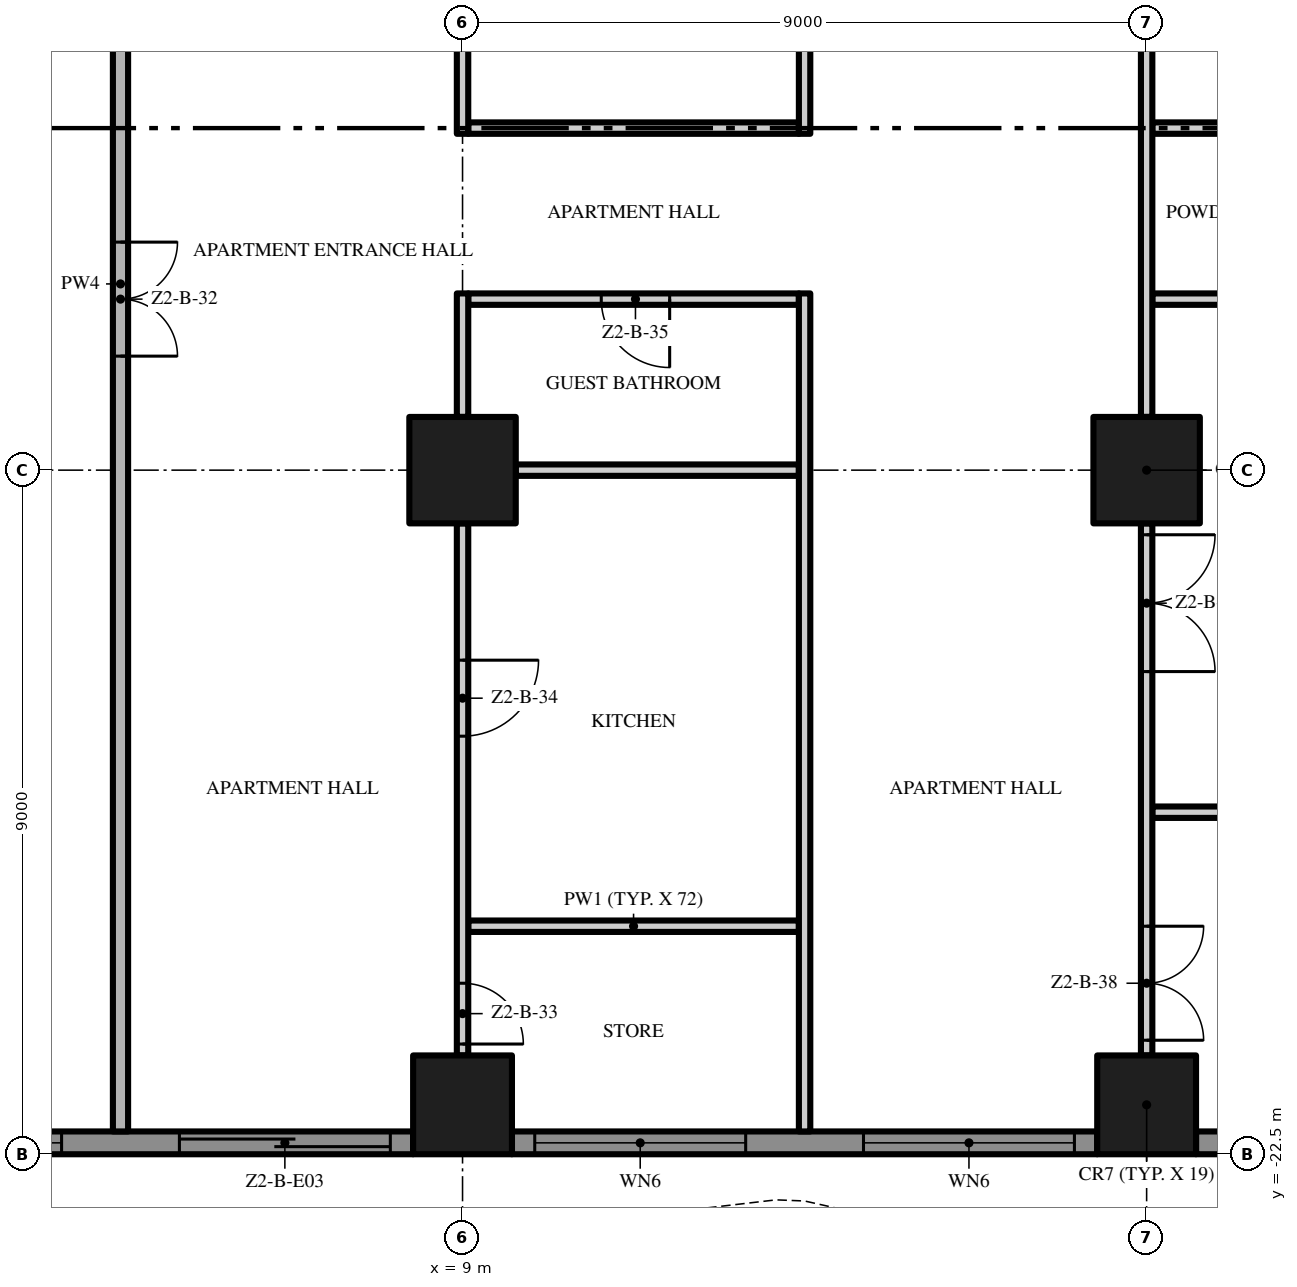
"""IFC4 building model, lengths in metres.
Left out: names, types, materials, properties, quantities, classifications, styles, units other than length and angle.
Written with IfcOpenShell. Run it as: python <this file> out.ifc"""

import sys

from ifc_helpers import new_model, si_unit, direction, frame, frame_2d, origin, origin_2d, place, context, subcontext, project, spatial, polyline, rectangle, outline, extrude, element, fill, save


model = new_model("IFC4")
c1 = context("Model", 3, precision=1e-05, world=origin(), true_north=direction((0.0, 1.0)))
c2 = subcontext(c1, "Body", "Model", "MODEL_VIEW")
j1 = project(units=[si_unit("LENGTHUNIT", "METRE"), si_unit("PLANEANGLEUNIT", "RADIAN")], contexts=[c1])
p1 = place(None, origin())
s1 = spatial("IfcSite", under=j1, at=p1, CompositionType="ELEMENT")
p2 = place(p1, origin())
s2 = spatial("IfcBuilding", under=s1, at=p2, CompositionType="ELEMENT")
p3 = place(p2, frame((0.0, 0.0, 88.4)))
s3 = spatial("IfcBuildingStorey", under=s2, at=p3, CompositionType="ELEMENT", Elevation=88.4)
p4 = place(p3, frame((18.0, -13.5, 0.0), z_axis=(0.0, 0.0, 1.0), x_axis=(1.0, 0.0, 0.0)))
e1 = element("IfcColumn", 1, at=p4, inside=s3, PredefinedType="COLUMN", context=c2, shape_type="SweptSolid", body=[
    extrude(rectangle(XDim=1.4, YDim=1.4, at=origin_2d()), origin(), (0.0, 0.0, 1.0), 3.5),
])
p5 = place(p3, frame((18.0, -21.85, 0.0), z_axis=(0.0, 0.0, 1.0), x_axis=(1.0, 0.0, 0.0)))
e2 = element("IfcColumn", 2, at=p5, inside=s3, PredefinedType="COLUMN", context=c2, shape_type="SweptSolid", body=[
    extrude(rectangle(XDim=1.3, YDim=1.3, at=origin_2d()), origin(), (0.0, 0.0, 1.0), 3.5),
])
p6 = place(p3, frame((9.0, -13.5, 0.0), z_axis=(0.0, 0.0, 1.0), x_axis=(1.0, 0.0, 0.0)))
e3 = element("IfcColumn", 3, at=p6, inside=s3, PredefinedType="COLUMN", context=c2, shape_type="SweptSolid", body=[
    extrude(rectangle(XDim=1.4, YDim=1.4, at=origin_2d()), origin(), (0.0, 0.0, 1.0), 3.5),
])
p7 = place(p3, frame((9.0, -21.85, 0.0), z_axis=(0.0, 0.0, 1.0), x_axis=(1.0, 0.0, 0.0)))
e4 = element("IfcColumn", 4, at=p7, inside=s3, PredefinedType="COLUMN", context=c2, shape_type="SweptSolid", body=[
    extrude(rectangle(XDim=1.3, YDim=1.3, at=origin_2d()), origin(), (0.0, 0.0, 1.0), 3.5),
])
p8 = place(p3, frame((8.35, -22.35, 0.0), z_axis=(0.0, 0.0, 1.0), x_axis=(-1.0, 0.0, 0.0)))
e5 = element("IfcWall", 5, at=p8, inside=s3, PredefinedType="SOLIDWALL", context=c2, shape_type="SweptSolid", body=[
    extrude(rectangle(XDim=7.7, YDim=0.3, at=frame_2d((3.85, 0.0))), origin(), (0.0, 0.0, 1.0), 3.5),
])
p9 = place(p8, frame((4.625, 0.0, 0.45)))
e6 = element("IfcOpeningElement", 6, at=p9, cuts=e5, PredefinedType="OPENING", context=c2, shape_type="SweptSolid", body=[
    extrude(rectangle(XDim=2.775, YDim=2.65, at=frame_2d((1.387, 1.325))), frame((0.0, 0.16, 0.0), z_axis=(0.0, -1.0, 0.0), x_axis=(1.0, 0.0, 0.0)), (0.0, 0.0, 1.0), 0.32),
])
p10 = place(p8, frame((0.3, 0.0, 0.0)))
e7 = element("IfcOpeningElement", 7, at=p10, cuts=e5, PredefinedType="OPENING", context=c2, shape_type="SweptSolid", body=[
    extrude(rectangle(XDim=2.775, YDim=2.4, at=frame_2d((1.387, 1.2))), frame((0.0, 0.16, 0.0), z_axis=(0.0, -1.0, 0.0), x_axis=(1.0, 0.0, 0.0)), (0.0, 0.0, 1.0), 0.32),
])
p11 = place(p3, frame((17.35, -22.35, 0.0), z_axis=(0.0, 0.0, 1.0), x_axis=(-1.0, 0.0, 0.0)))
e8 = element("IfcWall", 8, at=p11, inside=s3, PredefinedType="SOLIDWALL", context=c2, shape_type="SweptSolid", body=[
    extrude(rectangle(XDim=7.7, YDim=0.3, at=frame_2d((3.85, 0.0))), origin(), (0.0, 0.0, 1.0), 3.5),
])
p12 = place(p11, frame((4.625, 0.0, 0.45)))
e9 = element("IfcOpeningElement", 9, at=p12, cuts=e8, PredefinedType="OPENING", context=c2, shape_type="SweptSolid", body=[
    extrude(rectangle(XDim=2.775, YDim=2.65, at=frame_2d((1.387, 1.325))), frame((0.0, 0.16, 0.0), z_axis=(0.0, -1.0, 0.0), x_axis=(1.0, 0.0, 0.0)), (0.0, 0.0, 1.0), 0.32),
])
p13 = place(p11, frame((0.3, 0.0, 0.45)))
e10 = element("IfcOpeningElement", 10, at=p13, cuts=e8, PredefinedType="OPENING", context=c2, shape_type="SweptSolid", body=[
    extrude(rectangle(XDim=2.775, YDim=2.65, at=frame_2d((1.387, 1.325))), frame((0.0, 0.16, 0.0), z_axis=(0.0, -1.0, 0.0), x_axis=(1.0, 0.0, 0.0)), (0.0, 0.0, 1.0), 0.32),
])
p14 = place(p3, frame((22.5, -22.35, 0.0), z_axis=(0.0, 0.0, 1.0), x_axis=(-1.0, 0.0, 0.0)))
e11 = element("IfcWall", 11, at=p14, inside=s3, PredefinedType="SOLIDWALL", context=c2, shape_type="SweptSolid", body=[
    extrude(rectangle(XDim=3.85, YDim=0.3, at=frame_2d((1.925, 0.0))), origin(), (0.0, 0.0, 1.0), 3.5),
])
p15 = place(p14, frame((0.775, 0.0, 0.0)))
e12 = element("IfcOpeningElement", 12, at=p15, cuts=e11, PredefinedType="OPENING", context=c2, shape_type="SweptSolid", body=[
    extrude(rectangle(XDim=2.775, YDim=2.4, at=frame_2d((1.387, 1.2))), frame((0.0, 0.16, 0.0), z_axis=(0.0, -1.0, 0.0), x_axis=(1.0, 0.0, 0.0)), (0.0, 0.0, 1.0), 0.32),
])
p16 = place(p3, origin())
e13 = element("IfcWall", 13, at=p16, inside=s3, PredefinedType="USERDEFINED", context=c2, shape_type="SweptSolid", body=[
    extrude(outline(polyline([(-22.5, -25.149), (-21.0, -24.488), (-19.5, -23.755), (-18.0, -23.231), (-16.875, -23.1), (-16.5, -23.115), (-15.0, -23.451), (-13.5, -24.112), (-12.0, -24.845), (-10.5, -25.369), (-9.375, -25.5), (-9.0, -25.485), (-7.5, -25.149), (-6.0, -24.488), (-4.5, -23.755), (-3.0, -23.231), (-1.875, -23.1), (-1.5, -23.115), (0.0, -23.451), (1.5, -24.112), (3.0, -24.845), (4.5, -25.369), (5.625, -25.5), (6.0, -25.485), (7.5, -25.149), (9.0, -24.488), (10.5, -23.755), (12.0, -23.231), (13.125, -23.1), (13.5, -23.115), (15.0, -23.451), (16.5, -24.112), (18.0, -24.845), (19.5, -25.369), (20.625, -25.5), (21.0, -25.485), (22.5, -25.149), (22.445, -24.905), (20.967, -25.236), (20.635, -25.249), (19.556, -25.124), (18.096, -24.614), (16.605, -23.885), (15.079, -23.213), (13.533, -22.866), (13.115, -22.849), (11.944, -22.986), (10.404, -23.524), (8.895, -24.261), (7.421, -24.91), (5.967, -25.236), (5.635, -25.249), (4.556, -25.124), (3.096, -24.614), (1.605, -23.885), (0.079, -23.213), (-1.467, -22.866), (-1.885, -22.849), (-3.056, -22.986), (-4.596, -23.524), (-6.105, -24.261), (-7.579, -24.91), (-9.033, -25.236), (-9.365, -25.249), (-10.444, -25.124), (-11.904, -24.614), (-13.395, -23.885), (-14.921, -23.213), (-16.467, -22.866), (-16.885, -22.849), (-18.056, -22.986), (-19.596, -23.524), (-21.105, -24.261), (-22.601, -24.92), (-22.5, -25.149)])), origin(), (0.0, 0.0, 1.0), 0.9),
])
p17 = place(p3, frame((9.075, -19.5, 0.0), z_axis=(0.0, 0.0, 1.0), x_axis=(1.0, 0.0, 0.0)))
e14 = element("IfcWall", 14, at=p17, inside=s3, PredefinedType="PARTITIONING", context=c2, shape_type="SweptSolid", body=[
    extrude(rectangle(XDim=4.35, YDim=0.15, at=frame_2d((2.175, 0.0))), origin(), (0.0, 0.0, 1.0), 3.5),
])
p18 = place(p3, frame((18.075, -18.0, 0.0), z_axis=(0.0, 0.0, 1.0), x_axis=(1.0, 0.0, 0.0)))
e15 = element("IfcWall", 15, at=p18, inside=s3, PredefinedType="PARTITIONING", context=c2, shape_type="SweptSolid", body=[
    extrude(rectangle(XDim=3.775, YDim=0.15, at=frame_2d((1.887, 0.0))), origin(), (0.0, 0.0, 1.0), 3.5),
])
p19 = place(p3, frame((9.7, -13.5, 0.0), z_axis=(0.0, 0.0, 1.0), x_axis=(1.0, 0.0, 0.0)))
e16 = element("IfcWall", 16, at=p19, inside=s3, PredefinedType="PARTITIONING", context=c2, shape_type="SweptSolid", body=[
    extrude(rectangle(XDim=3.725, YDim=0.15, at=frame_2d((1.863, 0.0))), origin(), (0.0, 0.0, 1.0), 3.5),
])
p20 = place(p3, frame((13.425, -11.25, 0.0), z_axis=(0.0, 0.0, 1.0), x_axis=(-1.0, 0.0, 0.0)))
e17 = element("IfcWall", 17, at=p20, inside=s3, PredefinedType="PARTITIONING", context=c2, shape_type="SweptSolid", body=[
    extrude(rectangle(XDim=4.35, YDim=0.15, at=frame_2d((2.175, 0.0))), origin(), (0.0, 0.0, 1.0), 3.5),
])
p21 = place(p20, frame((1.7, 0.0, 0.0)))
e18 = element("IfcOpeningElement", 18, at=p21, cuts=e17, PredefinedType="OPENING", context=c2, shape_type="SweptSolid", body=[
    extrude(rectangle(XDim=0.9, YDim=2.1, at=frame_2d((0.45, 1.05))), frame((0.0, 0.085, 0.0), z_axis=(0.0, -1.0, 0.0), x_axis=(1.0, 0.0, 0.0)), (0.0, 0.0, 1.0), 0.17),
])
p22 = place(p3, frame((18.075, -11.25, 0.0), z_axis=(0.0, 0.0, 1.0), x_axis=(1.0, 0.0, 0.0)))
e19 = element("IfcWall", 19, at=p22, inside=s3, PredefinedType="PARTITIONING", context=c2, shape_type="SweptSolid", body=[
    extrude(rectangle(XDim=2.85, YDim=0.15, at=frame_2d((1.425, 0.0))), origin(), (0.0, 0.0, 1.0), 3.5),
])
p23 = place(p3, frame((9.075, -9.0, 0.0), z_axis=(0.0, 0.0, 1.0), x_axis=(1.0, 0.0, 0.0)))
e20 = element("IfcWall", 20, at=p23, inside=s3, PredefinedType="PARTITIONING", context=c2, shape_type="SweptSolid", body=[
    extrude(rectangle(XDim=4.35, YDim=0.15, at=frame_2d((2.175, 0.0))), origin(), (0.0, 0.0, 1.0), 3.5),
])
p24 = place(p3, frame((18.075, -9.0, 0.0), z_axis=(0.0, 0.0, 1.0), x_axis=(1.0, 0.0, 0.0)))
e21 = element("IfcWall", 21, at=p24, inside=s3, PredefinedType="PARTITIONING", context=c2, shape_type="SweptSolid", body=[
    extrude(rectangle(XDim=2.85, YDim=0.15, at=frame_2d((1.425, 0.0))), origin(), (0.0, 0.0, 1.0), 3.5),
])
p25 = place(p3, frame((4.5, 0.1, 0.0), z_axis=(0.0, 0.0, 1.0), x_axis=(0.0, -1.0, 0.0)))
e22 = element("IfcWall", 22, at=p25, inside=s3, PredefinedType="PARTITIONING", context=c2, shape_type="SweptSolid", body=[
    extrude(rectangle(XDim=22.3, YDim=0.2, at=frame_2d((11.15, 0.0))), origin(), (0.0, 0.0, 1.0), 3.5),
])
p26 = place(p25, frame((10.6, 0.0, 0.0)))
e23 = element("IfcOpeningElement", 23, at=p26, cuts=e22, PredefinedType="OPENING", context=c2, shape_type="SweptSolid", body=[
    extrude(rectangle(XDim=1.5, YDim=2.4, at=frame_2d((0.75, 1.2))), frame((0.0, 0.11, 0.0), z_axis=(0.0, -1.0, 0.0), x_axis=(1.0, 0.0, 0.0)), (0.0, 0.0, 1.0), 0.22),
])
p27 = place(p3, frame((9.0, -14.2, 0.0), z_axis=(0.0, 0.0, 1.0), x_axis=(0.0, -1.0, 0.0)))
e24 = element("IfcWall", 24, at=p27, inside=s3, PredefinedType="PARTITIONING", context=c2, shape_type="SweptSolid", body=[
    extrude(rectangle(XDim=7.0, YDim=0.15, at=frame_2d((3.5, 0.0))), origin(), (0.0, 0.0, 1.0), 3.5),
])
p28 = place(p27, frame((6.05, 0.0, 0.0)))
e25 = element("IfcOpeningElement", 25, at=p28, cuts=e24, PredefinedType="OPENING", context=c2, shape_type="SweptSolid", body=[
    extrude(rectangle(XDim=0.8, YDim=2.0, at=frame_2d((0.4, 1.0))), frame((0.0, 0.085, 0.0), z_axis=(0.0, -1.0, 0.0), x_axis=(1.0, 0.0, 0.0)), (0.0, 0.0, 1.0), 0.17),
])
p29 = place(p27, frame((1.8, 0.0, 0.0)))
e26 = element("IfcOpeningElement", 26, at=p29, cuts=e24, PredefinedType="OPENING", context=c2, shape_type="SweptSolid", body=[
    extrude(rectangle(XDim=1.0, YDim=2.4, at=frame_2d((0.5, 1.2))), frame((0.0, 0.085, 0.0), z_axis=(0.0, -1.0, 0.0), x_axis=(1.0, 0.0, 0.0)), (0.0, 0.0, 1.0), 0.17),
])
p30 = place(p3, frame((9.0, -12.8, 0.0), z_axis=(0.0, 0.0, 1.0), x_axis=(0.0, 1.0, 0.0)))
e27 = element("IfcWall", 27, at=p30, inside=s3, PredefinedType="PARTITIONING", context=c2, shape_type="SweptSolid", body=[
    extrude(rectangle(XDim=1.625, YDim=0.15, at=frame_2d((0.812, 0.0))), origin(), (0.0, 0.0, 1.0), 3.5),
])
p31 = place(p3, frame((9.0, -5.2, 0.0), z_axis=(0.0, 0.0, 1.0), x_axis=(0.0, -1.0, 0.0)))
e28 = element("IfcWall", 28, at=p31, inside=s3, PredefinedType="PARTITIONING", context=c2, shape_type="SweptSolid", body=[
    extrude(rectangle(XDim=3.875, YDim=0.15, at=frame_2d((1.938, 0.0))), origin(), (0.0, 0.0, 1.0), 3.5),
])
p32 = place(p31, frame((0.75, 0.0, 0.0)))
e29 = element("IfcOpeningElement", 29, at=p32, cuts=e28, PredefinedType="OPENING", context=c2, shape_type="SweptSolid", body=[
    extrude(rectangle(XDim=0.9, YDim=2.1, at=frame_2d((0.45, 1.05))), frame((0.0, 0.085, 0.0), z_axis=(0.0, -1.0, 0.0), x_axis=(1.0, 0.0, 0.0)), (0.0, 0.0, 1.0), 0.17),
])
p33 = place(p3, frame((13.5, -22.2, 0.0), z_axis=(0.0, 0.0, 1.0), x_axis=(0.0, 1.0, 0.0)))
e30 = element("IfcWall", 30, at=p33, inside=s3, PredefinedType="PARTITIONING", context=c2, shape_type="SweptSolid", body=[
    extrude(rectangle(XDim=11.025, YDim=0.15, at=frame_2d((5.513, 0.0))), origin(), (0.0, 0.0, 1.0), 3.5),
])
p34 = place(p3, frame((13.5, -9.075, 0.0), z_axis=(0.0, 0.0, 1.0), x_axis=(0.0, 1.0, 0.0)))
e31 = element("IfcWall", 31, at=p34, inside=s3, PredefinedType="PARTITIONING", context=c2, shape_type="SweptSolid", body=[
    extrude(rectangle(XDim=8.975, YDim=0.15, at=frame_2d((4.487, 0.0))), origin(), (0.0, 0.0, 1.0), 3.5),
])
p35 = place(p3, frame((18.0, -14.2, 0.0), z_axis=(0.0, 0.0, 1.0), x_axis=(0.0, -1.0, 0.0)))
e32 = element("IfcWall", 32, at=p35, inside=s3, PredefinedType="PARTITIONING", context=c2, shape_type="SweptSolid", body=[
    extrude(rectangle(XDim=7.0, YDim=0.15, at=frame_2d((3.5, 0.0))), origin(), (0.0, 0.0, 1.0), 3.5),
])
p36 = place(p35, frame((5.3, 0.0, 0.0)))
e33 = element("IfcOpeningElement", 33, at=p36, cuts=e32, PredefinedType="OPENING", context=c2, shape_type="SweptSolid", body=[
    extrude(rectangle(XDim=1.5, YDim=2.4, at=frame_2d((0.75, 1.2))), frame((0.0, 0.085, 0.0), z_axis=(0.0, -1.0, 0.0), x_axis=(1.0, 0.0, 0.0)), (0.0, 0.0, 1.0), 0.17),
])
p37 = place(p35, frame((0.15, 0.0, 0.0)))
e34 = element("IfcOpeningElement", 34, at=p37, cuts=e32, PredefinedType="OPENING", context=c2, shape_type="SweptSolid", body=[
    extrude(rectangle(XDim=1.8, YDim=2.4, at=frame_2d((0.9, 1.2))), frame((0.0, 0.085, 0.0), z_axis=(0.0, -1.0, 0.0), x_axis=(1.0, 0.0, 0.0)), (0.0, 0.0, 1.0), 0.17),
])
p38 = place(p3, frame((18.0, -5.2, 0.0), z_axis=(0.0, 0.0, 1.0), x_axis=(0.0, -1.0, 0.0)))
e35 = element("IfcWall", 35, at=p38, inside=s3, PredefinedType="PARTITIONING", context=c2, shape_type="SweptSolid", body=[
    extrude(rectangle(XDim=7.6, YDim=0.15, at=frame_2d((3.8, 0.0))), origin(), (0.0, 0.0, 1.0), 3.5),
])
p39 = place(p38, frame((0.15, 0.0, 0.0)))
e36 = element("IfcOpeningElement", 36, at=p39, cuts=e35, PredefinedType="OPENING", context=c2, shape_type="SweptSolid", body=[
    extrude(rectangle(XDim=1.0, YDim=2.4, at=frame_2d((0.5, 1.2))), frame((0.0, 0.085, 0.0), z_axis=(0.0, -1.0, 0.0), x_axis=(1.0, 0.0, 0.0)), (0.0, 0.0, 1.0), 0.17),
])
p40 = place(p9, origin())
e37 = element("IfcWindow", 37, at=p40, inside=s3, PartitioningType="SINGLE_PANEL", PredefinedType="WINDOW", context=c2, shape_type="SweptSolid", body=[
    extrude(rectangle(XDim=2.775, YDim=2.65, at=frame_2d((1.387, 1.325))), frame((0.0, 0.03, 0.0), z_axis=(0.0, -1.0, 0.0), x_axis=(1.0, 0.0, 0.0)), (0.0, 0.0, 1.0), 0.06),
])
fill(e6, e37)
p41 = place(p10, origin())
e38 = element("IfcDoor", 38, at=p41, inside=s3, OperationType="SINGLE_SWING_LEFT", PredefinedType="DOOR", context=c2, shape_type="SweptSolid", body=[
    extrude(rectangle(XDim=2.775, YDim=2.4, at=frame_2d((1.387, 1.2))), frame((0.0, 0.025, 0.0), z_axis=(0.0, -1.0, 0.0), x_axis=(1.0, 0.0, 0.0)), (0.0, 0.0, 1.0), 0.05),
])
fill(e7, e38)
p42 = place(p12, origin())
e39 = element("IfcWindow", 39, at=p42, inside=s3, PartitioningType="SINGLE_PANEL", PredefinedType="WINDOW", context=c2, shape_type="SweptSolid", body=[
    extrude(rectangle(XDim=2.775, YDim=2.65, at=frame_2d((1.387, 1.325))), frame((0.0, 0.03, 0.0), z_axis=(0.0, -1.0, 0.0), x_axis=(1.0, 0.0, 0.0)), (0.0, 0.0, 1.0), 0.06),
])
fill(e9, e39)
p43 = place(p13, origin())
e40 = element("IfcWindow", 40, at=p43, inside=s3, PartitioningType="SINGLE_PANEL", PredefinedType="WINDOW", context=c2, shape_type="SweptSolid", body=[
    extrude(rectangle(XDim=2.775, YDim=2.65, at=frame_2d((1.387, 1.325))), frame((0.0, 0.03, 0.0), z_axis=(0.0, -1.0, 0.0), x_axis=(1.0, 0.0, 0.0)), (0.0, 0.0, 1.0), 0.06),
])
fill(e10, e40)
p44 = place(p26, origin())
e41 = element("IfcDoor", 41, at=p44, inside=s3, OperationType="DOUBLE_DOOR_SINGLE_SWING", PredefinedType="DOOR", context=c2, shape_type="SweptSolid", body=[
    extrude(rectangle(XDim=1.5, YDim=2.4, at=frame_2d((0.75, 1.2))), frame((0.0, 0.025, 0.0), z_axis=(0.0, -1.0, 0.0), x_axis=(1.0, 0.0, 0.0)), (0.0, 0.0, 1.0), 0.05),
])
fill(e23, e41)
p45 = place(p28, origin())
e42 = element("IfcDoor", 42, at=p45, inside=s3, OperationType="SINGLE_SWING_RIGHT", PredefinedType="DOOR", context=c2, shape_type="SweptSolid", body=[
    extrude(rectangle(XDim=0.8, YDim=2.0, at=frame_2d((0.4, 1.0))), frame((0.0, 0.025, 0.0), z_axis=(0.0, -1.0, 0.0), x_axis=(1.0, 0.0, 0.0)), (0.0, 0.0, 1.0), 0.05),
])
fill(e25, e42)
p46 = place(p29, origin())
e43 = element("IfcDoor", 43, at=p46, inside=s3, OperationType="SINGLE_SWING_LEFT", PredefinedType="DOOR", context=c2, shape_type="SweptSolid", body=[
    extrude(rectangle(XDim=1.0, YDim=2.4, at=frame_2d((0.5, 1.2))), frame((0.0, 0.025, 0.0), z_axis=(0.0, -1.0, 0.0), x_axis=(1.0, 0.0, 0.0)), (0.0, 0.0, 1.0), 0.05),
])
fill(e26, e43)
p47 = place(p21, origin())
e44 = element("IfcDoor", 44, at=p47, inside=s3, OperationType="SINGLE_SWING_LEFT", PredefinedType="DOOR", context=c2, shape_type="SweptSolid", body=[
    extrude(rectangle(XDim=0.9, YDim=2.1, at=frame_2d((0.45, 1.05))), frame((0.0, 0.025, 0.0), z_axis=(0.0, -1.0, 0.0), x_axis=(1.0, 0.0, 0.0)), (0.0, 0.0, 1.0), 0.05),
])
fill(e18, e44)
p48 = place(p36, origin())
e45 = element("IfcDoor", 45, at=p48, inside=s3, OperationType="DOUBLE_DOOR_SINGLE_SWING", PredefinedType="DOOR", context=c2, shape_type="SweptSolid", body=[
    extrude(rectangle(XDim=1.5, YDim=2.4, at=frame_2d((0.75, 1.2))), frame((0.0, 0.025, 0.0), z_axis=(0.0, -1.0, 0.0), x_axis=(1.0, 0.0, 0.0)), (0.0, 0.0, 1.0), 0.05),
])
fill(e33, e45)
p49 = place(p37, origin())
e46 = element("IfcDoor", 46, at=p49, inside=s3, OperationType="DOUBLE_DOOR_SINGLE_SWING", PredefinedType="DOOR", context=c2, shape_type="SweptSolid", body=[
    extrude(rectangle(XDim=1.8, YDim=2.4, at=frame_2d((0.9, 1.2))), frame((0.0, 0.025, 0.0), z_axis=(0.0, -1.0, 0.0), x_axis=(1.0, 0.0, 0.0)), (0.0, 0.0, 1.0), 0.05),
])
fill(e34, e46)
save(model, sys.argv[1])
